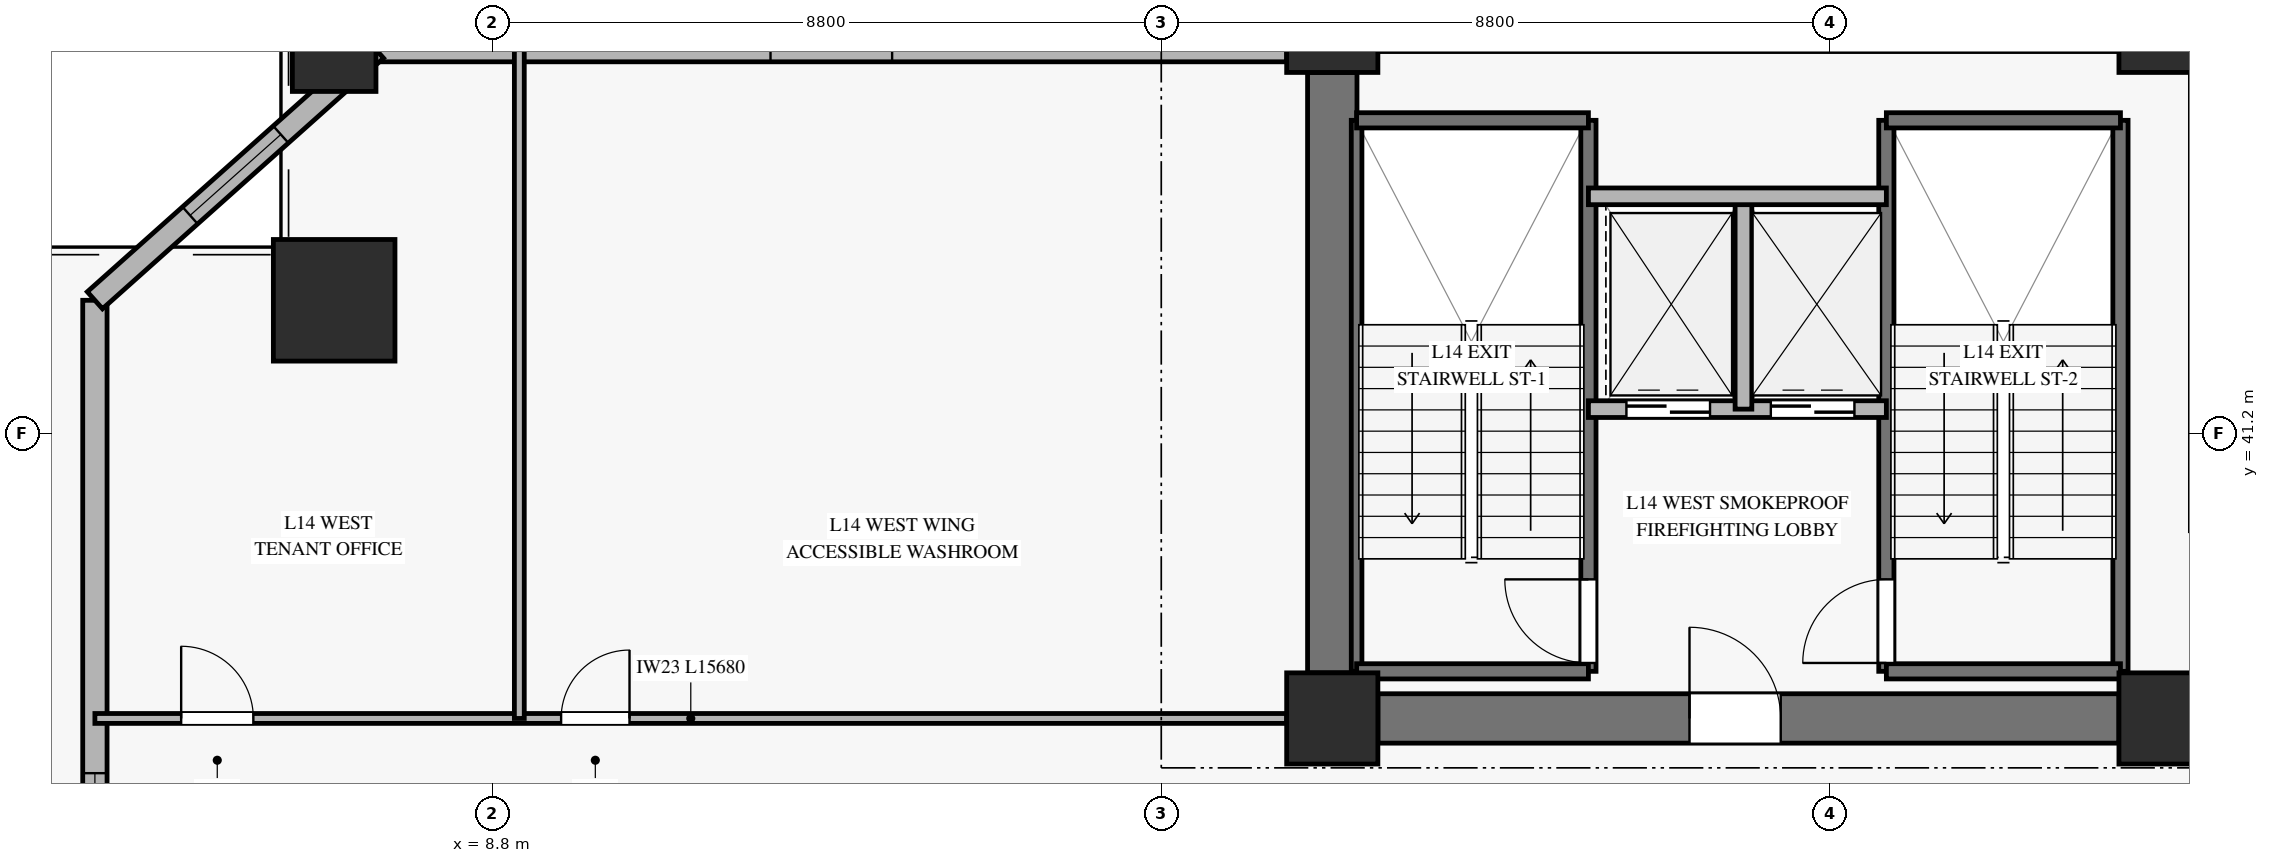
"""IFC4 building model, lengths in metres.
Left out: names, types, materials, properties, quantities, classifications, styles, units other than length and angle.
Written with IfcOpenShell. Run it as: python <this file> out.ifc"""

import sys

from ifc_helpers import new_model, si_unit, direction, frame, frame_2d, origin, origin_2d, place, context, subcontext, project, spatial, rectangle, hollow_rectangle, extrude, source, transform, mapped, element, fill, save


model = new_model("IFC4")
c1 = context("Model", 3, precision=1e-05, world=origin(), true_north=direction((0.0, 1.0)))
c2 = subcontext(c1, "Body", "Model", "MODEL_VIEW")
j1 = project(units=[si_unit("LENGTHUNIT", "METRE"), si_unit("PLANEANGLEUNIT", "RADIAN")], contexts=[c1])
p1 = place(None, origin())
s1 = spatial("IfcSite", under=j1, at=p1, CompositionType="ELEMENT")
p2 = place(p1, origin())
s2 = spatial("IfcBuilding", under=s1, at=p2, CompositionType="ELEMENT")
p3 = place(p2, frame((0.0, 0.0, 57.2)))
s3 = spatial("IfcBuildingStorey", under=s2, at=p3, CompositionType="ELEMENT", Elevation=57.2)
m1 = source(origin(), c2, "Body", "SweptSolid", [
    extrude(rectangle(XDim=1.2, YDim=1.2, at=origin_2d()), origin(), (0.0, 0.0, 1.0), 3.68),
])
for number, where, z_axis, x_axis in (
    (1, (19.85, 37.45, 0.0), (0.0, 0.0, 1.0), (1.0, 0.0, 0.0)),
    (2, (19.85, 46.55, 0.0), (0.0, 0.0, 1.0), (1.0, 0.0, 0.0)),
    (3, (30.8, 37.45, 0.0), (0.0, 0.0, 1.0), (1.0, 0.0, 0.0)),
    (4, (30.8, 46.55, 0.0), (0.0, 0.0, 1.0), (1.0, 0.0, 0.0)),
):
    element("IfcColumn", number, at=place(p3, frame(where, z_axis=z_axis, x_axis=x_axis)), inside=s3, PredefinedType="PILASTER", context=c2, shape_type="MappedRepresentation", body=[
        mapped(m1, transform((0.0, 0.0, 0.0), x_axis=(1.0, 0.0, 0.0), y_axis=(0.0, 1.0, 0.0), z_axis=(0.0, 0.0, 1.0), scale=1.0)),
    ])
p4 = place(p3, frame((20.45, 37.45, 0.0), z_axis=(0.0, 0.0, 1.0), x_axis=(1.0, 0.0, 0.0)))
e5 = element("IfcWall", 5, at=p4, inside=s3, PredefinedType="SHEAR", context=c2, shape_type="SweptSolid", body=[
    extrude(rectangle(XDim=9.75, YDim=0.65, at=frame_2d((4.875, 0.0))), origin(), (0.0, 0.0, 1.0), 3.68),
])
p5 = place(p4, frame((4.1, 0.0, 0.0)))
e6 = element("IfcOpeningElement", 6, at=p5, cuts=e5, PredefinedType="OPENING", context=c2, shape_type="SweptSolid", body=[
    extrude(rectangle(XDim=1.2, YDim=2.15, at=frame_2d((0.6, 1.075))), frame((0.0, 0.335, 0.0), z_axis=(0.0, -1.0, 0.0), x_axis=(1.0, 0.0, 0.0)), (0.0, 0.0, 1.0), 0.67),
])
p6 = place(p3, frame((19.85, 38.05, 0.0), z_axis=(0.0, 0.0, 1.0), x_axis=(0.0, 1.0, 0.0)))
e7 = element("IfcWall", 7, at=p6, inside=s3, PredefinedType="SHEAR", context=c2, shape_type="SweptSolid", body=[
    extrude(rectangle(XDim=7.9, YDim=0.65, at=frame_2d((3.95, 0.0))), origin(), (0.0, 0.0, 1.0), 3.68),
])
m2 = source(origin(), c2, "Body", "SweptSolid", [
    extrude(hollow_rectangle(XDim=1.6, YDim=1.6, WallThickness=0.075, at=origin_2d()), origin(), (0.0, 0.0, 1.0), 3.686),
])
p7 = place(p3, frame((6.718, 42.952, 0.0), z_axis=(0.056697506007, 0.007087188251, 0.998366247714), x_axis=(-0.124034734589, 0.992277876714, 0.0)))
e8 = element("IfcColumn", 8, at=p7, inside=s3, PredefinedType="COLUMN", context=c2, shape_type="MappedRepresentation", body=[
    mapped(m2, transform((0.0, 0.0, 0.0), x_axis=(1.0, 0.0, 0.0), y_axis=(0.0, 1.0, 0.0), z_axis=(0.0, 0.0, 1.0), scale=1.0)),
])
m3 = source(origin(), c2, "Body", "SweptSolid", [
    extrude(hollow_rectangle(XDim=1.1, YDim=1.1, WallThickness=0.05, at=origin_2d()), origin(), (0.0, 0.0, 1.0), 3.686),
])
p8 = place(p3, frame((6.718, 46.25, 0.0), z_axis=(0.056698929969, 0.0, 0.998391321747), x_axis=(0.0, 1.0, 0.0)))
e9 = element("IfcColumn", 9, at=p8, inside=s3, PredefinedType="COLUMN", context=c2, shape_type="MappedRepresentation", body=[
    mapped(m3, transform((0.0, 0.0, 0.0), x_axis=(1.0, 0.0, 0.0), y_axis=(0.0, 1.0, 0.0), z_axis=(0.0, 0.0, 1.0), scale=1.0)),
])
p9 = place(p3, frame((3.57, 25.777, 0.0), z_axis=(0.0, 0.0, 1.0), x_axis=(0.0, 1.0, 0.0)))
e10 = element("IfcWall", 10, at=p9, inside=s3, PredefinedType="SOLIDWALL", context=c2, shape_type="SweptSolid", body=[
    extrude(rectangle(XDim=17.175, YDim=0.32, at=frame_2d((8.587, 0.0))), origin(), (0.0, 0.0, 1.0), 3.16),
])
p10 = place(p9, frame((9.353, 0.0, 0.45)))
e11 = element("IfcOpeningElement", 11, at=p10, cuts=e10, PredefinedType="OPENING", context=c2, shape_type="SweptSolid", body=[
    extrude(rectangle(XDim=1.6, YDim=2.0, at=frame_2d((0.8, 1.0))), frame((0.0, 0.17, 0.0), z_axis=(0.0, -1.0, 0.0), x_axis=(1.0, 0.0, 0.0)), (0.0, 0.0, 1.0), 0.34),
])
p11 = place(p3, frame((7.268, 46.25, 0.0), z_axis=(0.0, 0.0, 1.0), x_axis=(1.0, 0.0, 0.0)))
e12 = element("IfcWall", 12, at=p11, inside=s3, PredefinedType="SOLIDWALL", context=c2, shape_type="SweptSolid", body=[
    extrude(rectangle(XDim=11.982, YDim=0.32, at=frame_2d((5.991, 0.0))), origin(), (0.0, 0.0, 1.0), 3.16),
])
p12 = place(p11, frame((5.191, 0.0, 0.45)))
e13 = element("IfcOpeningElement", 13, at=p12, cuts=e12, PredefinedType="OPENING", context=c2, shape_type="SweptSolid", body=[
    extrude(rectangle(XDim=1.6, YDim=2.0, at=frame_2d((0.8, 1.0))), frame((0.0, 0.17, 0.0), z_axis=(0.0, -1.0, 0.0), x_axis=(1.0, 0.0, 0.0)), (0.0, 0.0, 1.0), 0.34),
])
p13 = place(p3, frame((7.268, 46.25, 0.0), z_axis=(0.0, 0.0, 1.0), x_axis=(-0.746307341165, -0.665601496785, 0.0)))
e14 = element("IfcWall", 14, at=p13, inside=s3, PredefinedType="SOLIDWALL", context=c2, shape_type="SweptSolid", body=[
    extrude(rectangle(XDim=4.955, YDim=0.3, at=frame_2d((2.478, 0.0))), origin(), (0.0, 0.0, 1.0), 3.16),
])
p14 = place(p13, frame((1.677, 0.0, 0.45)))
e15 = element("IfcOpeningElement", 15, at=p14, cuts=e14, PredefinedType="OPENING", context=c2, shape_type="SweptSolid", body=[
    extrude(rectangle(XDim=1.6, YDim=2.0, at=frame_2d((0.8, 1.0))), frame((0.0, 0.16, 0.0), z_axis=(0.0, -1.0, 0.0), x_axis=(1.0, 0.0, 0.0)), (0.0, 0.0, 1.0), 0.32),
])
p15 = place(p3, frame((20.17, 38.07, 0.0), z_axis=(0.0, 0.0, 1.0), x_axis=(0.0, 1.0, 0.0)))
e16 = element("IfcWall", 16, at=p15, inside=s3, PredefinedType="SOLIDWALL", context=c2, shape_type="SweptSolid", body=[
    extrude(rectangle(XDim=7.25, YDim=0.14, at=frame_2d((3.625, 0.0))), origin(), (0.0, 0.0, 1.0), 3.9),
])
p16 = place(p3, frame((23.22, 38.07, 0.0), z_axis=(0.0, 0.0, 1.0), x_axis=(0.0, 1.0, 0.0)))
e17 = element("IfcWall", 17, at=p16, inside=s3, PredefinedType="SOLIDWALL", context=c2, shape_type="SweptSolid", body=[
    extrude(rectangle(XDim=7.25, YDim=0.2, at=frame_2d((3.625, 0.0))), origin(), (0.0, 0.0, 1.0), 3.9),
])
p17 = place(p16, frame((0.11, 0.0, 0.0)))
e18 = element("IfcOpeningElement", 18, at=p17, cuts=e17, PredefinedType="OPENING", context=c2, shape_type="SweptSolid", body=[
    extrude(rectangle(XDim=1.1, YDim=2.15, at=frame_2d((0.55, 1.075))), frame((0.0, 0.11, 0.0), z_axis=(0.0, -1.0, 0.0), x_axis=(1.0, 0.0, 0.0)), (0.0, 0.0, 1.0), 0.22),
])
for number, where, z_axis, x_axis in (
    (19, (20.17, 45.32, 0.0), (0.0, 0.0, 1.0), (1.0, 0.0, 0.0)),
    (20, (20.17, 38.07, 0.0), (0.0, 0.0, 1.0), (1.0, 0.0, 0.0)),
):
    element("IfcWall", number, at=place(p3, frame(where, z_axis=z_axis, x_axis=x_axis)), inside=s3, PredefinedType="SOLIDWALL", context=c2, shape_type="SweptSolid", body=[
        extrude(rectangle(XDim=3.05, YDim=0.2, at=frame_2d((1.525, 0.0))), origin(), (0.0, 0.0, 1.0), 3.9),
    ])
p18 = place(p3, frame((27.14, 38.07, 0.0), z_axis=(0.0, 0.0, 1.0), x_axis=(0.0, 1.0, 0.0)))
e21 = element("IfcWall", 21, at=p18, inside=s3, PredefinedType="SOLIDWALL", context=c2, shape_type="SweptSolid", body=[
    extrude(rectangle(XDim=7.25, YDim=0.2, at=frame_2d((3.625, 0.0))), origin(), (0.0, 0.0, 1.0), 3.9),
])
p19 = place(p18, frame((0.11, 0.0, 0.0)))
e22 = element("IfcOpeningElement", 22, at=p19, cuts=e21, PredefinedType="OPENING", context=c2, shape_type="SweptSolid", body=[
    extrude(rectangle(XDim=1.1, YDim=2.15, at=frame_2d((0.55, 1.075))), frame((0.0, 0.11, 0.0), z_axis=(0.0, -1.0, 0.0), x_axis=(1.0, 0.0, 0.0)), (0.0, 0.0, 1.0), 0.22),
])
p20 = place(p3, frame((30.22, 38.07, 0.0), z_axis=(0.0, 0.0, 1.0), x_axis=(0.0, 1.0, 0.0)))
e23 = element("IfcWall", 23, at=p20, inside=s3, PredefinedType="SOLIDWALL", context=c2, shape_type="SweptSolid", body=[
    extrude(rectangle(XDim=7.25, YDim=0.2, at=frame_2d((3.625, 0.0))), origin(), (0.0, 0.0, 1.0), 3.9),
])
for number, where, z_axis, x_axis in (
    (24, (27.14, 45.32, 0.0), (0.0, 0.0, 1.0), (1.0, 0.0, 0.0)),
    (25, (27.14, 38.07, 0.0), (0.0, 0.0, 1.0), (1.0, 0.0, 0.0)),
):
    element("IfcWall", number, at=place(p3, frame(where, z_axis=z_axis, x_axis=x_axis)), inside=s3, PredefinedType="SOLIDWALL", context=c2, shape_type="SweptSolid", body=[
        extrude(rectangle(XDim=3.08, YDim=0.2, at=frame_2d((1.54, 0.0))), origin(), (0.0, 0.0, 1.0), 3.9),
    ])
p21 = place(p3, frame((23.22, 41.52, 0.0), z_axis=(0.0, 0.0, 1.0), x_axis=(1.0, 0.0, 0.0)))
e26 = element("IfcWall", 26, at=p21, inside=s3, PredefinedType="SOLIDWALL", context=c2, shape_type="SweptSolid", body=[
    extrude(rectangle(XDim=3.92, YDim=0.22, at=frame_2d((1.96, 0.0))), origin(), (0.0, 0.0, 1.0), 3.68),
])
p22 = place(p21, frame((0.5, 0.0, 0.0)))
e27 = element("IfcOpeningElement", 27, at=p22, cuts=e26, PredefinedType="OPENING", context=c2, shape_type="SweptSolid", body=[
    extrude(rectangle(XDim=1.1, YDim=2.2, at=frame_2d((0.55, 1.1))), frame((0.0, 0.12, 0.0), z_axis=(0.0, -1.0, 0.0), x_axis=(1.0, 0.0, 0.0)), (0.0, 0.0, 1.0), 0.24),
])
p23 = place(p21, frame((2.4, 0.0, 0.0)))
e28 = element("IfcOpeningElement", 28, at=p23, cuts=e26, PredefinedType="OPENING", context=c2, shape_type="SweptSolid", body=[
    extrude(rectangle(XDim=1.1, YDim=2.2, at=frame_2d((0.55, 1.1))), frame((0.0, 0.12, 0.0), z_axis=(0.0, -1.0, 0.0), x_axis=(1.0, 0.0, 0.0)), (0.0, 0.0, 1.0), 0.24),
])
p24 = place(p3, frame((25.26, 41.52, 0.0), z_axis=(0.0, 0.0, 1.0), x_axis=(0.0, 1.0, 0.0)))
e29 = element("IfcWall", 29, at=p24, inside=s3, PredefinedType="SOLIDWALL", context=c2, shape_type="SweptSolid", body=[
    extrude(rectangle(XDim=2.8, YDim=0.22, at=frame_2d((1.4, 0.0))), origin(), (0.0, 0.0, 1.0), 3.68),
])
p25 = place(p3, frame((23.22, 44.32, 0.0), z_axis=(0.0, 0.0, 1.0), x_axis=(1.0, 0.0, 0.0)))
e30 = element("IfcWall", 30, at=p25, inside=s3, PredefinedType="SOLIDWALL", context=c2, shape_type="SweptSolid", body=[
    extrude(rectangle(XDim=3.92, YDim=0.22, at=frame_2d((1.96, 0.0))), origin(), (0.0, 0.0, 1.0), 3.68),
])
p26 = place(p3, frame((3.57, 37.45, 0.0), z_axis=(0.0, 0.0, 1.0), x_axis=(1.0, 0.0, 0.0)))
e31 = element("IfcWall", 31, at=p26, inside=s3, PredefinedType="PARTITIONING", context=c2, shape_type="SweptSolid", body=[
    extrude(rectangle(XDim=15.68, YDim=0.13, at=frame_2d((7.84, 0.0))), origin(), (0.0, 0.0, 1.0), 3.165),
])
p27 = place(p26, frame((1.135, 0.0, 0.0)))
e32 = element("IfcOpeningElement", 32, at=p27, cuts=e31, PredefinedType="OPENING", context=c2, shape_type="SweptSolid", body=[
    extrude(rectangle(XDim=0.95, YDim=2.1, at=frame_2d((0.475, 1.05))), frame((0.0, 0.075, 0.0), z_axis=(0.0, -1.0, 0.0), x_axis=(1.0, 0.0, 0.0)), (0.0, 0.0, 1.0), 0.15),
])
p28 = place(p26, frame((6.134, 0.0, 0.0)))
e33 = element("IfcOpeningElement", 33, at=p28, cuts=e31, PredefinedType="OPENING", context=c2, shape_type="SweptSolid", body=[
    extrude(rectangle(XDim=0.9, YDim=2.1, at=frame_2d((0.45, 1.05))), frame((0.0, 0.075, 0.0), z_axis=(0.0, -1.0, 0.0), x_axis=(1.0, 0.0, 0.0)), (0.0, 0.0, 1.0), 0.15),
])
p29 = place(p3, frame((9.154, 37.45, 0.0), z_axis=(0.0, 0.0, 1.0), x_axis=(0.0, 1.0, 0.0)))
e34 = element("IfcWall", 34, at=p29, inside=s3, PredefinedType="PARTITIONING", context=c2, shape_type="SweptSolid", body=[
    extrude(rectangle(XDim=8.8, YDim=0.13, at=frame_2d((4.4, 0.0))), origin(), (0.0, 0.0, 1.0), 3.68),
])
m4 = source(origin(), c2, "Body", "SweptSolid", [
    extrude(rectangle(XDim=1.6, YDim=2.0, at=frame_2d((0.8, 1.0))), frame((0.0, 0.03, 0.0), z_axis=(0.0, -1.0, 0.0), x_axis=(1.0, 0.0, 0.0)), (0.0, 0.0, 1.0), 0.06),
])
p30 = place(p10, origin())
e35 = element("IfcWindow", 35, at=p30, inside=s3, PartitioningType="SINGLE_PANEL", PredefinedType="WINDOW", context=c2, shape_type="MappedRepresentation", body=[
    mapped(m4, transform((0.0, 0.0, 0.0), x_axis=(1.0, 0.0, 0.0), y_axis=(0.0, 1.0, 0.0), z_axis=(0.0, 0.0, 1.0), scale=1.0)),
])
fill(e11, e35)
p31 = place(p14, origin())
e36 = element("IfcWindow", 36, at=p31, inside=s3, PartitioningType="SINGLE_PANEL", PredefinedType="WINDOW", context=c2, shape_type="MappedRepresentation", body=[
    mapped(m4, transform((0.0, 0.0, 0.0), x_axis=(1.0, 0.0, 0.0), y_axis=(0.0, 1.0, 0.0), z_axis=(0.0, 0.0, 1.0), scale=1.0)),
])
fill(e15, e36)
m5 = source(origin(), c2, "Body", "SweptSolid", [
    extrude(rectangle(XDim=1.1, YDim=2.15, at=frame_2d((0.55, 1.075))), frame((0.0, 0.025, 0.0), z_axis=(0.0, -1.0, 0.0), x_axis=(1.0, 0.0, 0.0)), (0.0, 0.0, 1.0), 0.05),
])
p32 = place(p17, origin())
e37 = element("IfcDoor", 37, at=p32, inside=s3, OperationType="SINGLE_SWING_RIGHT", PredefinedType="DOOR", context=c2, shape_type="MappedRepresentation", body=[
    mapped(m5, transform((0.0, 0.0, 0.0), x_axis=(1.0, 0.0, 0.0), y_axis=(0.0, 1.0, 0.0), z_axis=(0.0, 0.0, 1.0), scale=1.0)),
])
fill(e18, e37)
p33 = place(p19, origin())
e38 = element("IfcDoor", 38, at=p33, inside=s3, OperationType="SINGLE_SWING_LEFT", PredefinedType="DOOR", context=c2, shape_type="MappedRepresentation", body=[
    mapped(m5, transform((0.0, 0.0, 0.0), x_axis=(1.0, 0.0, 0.0), y_axis=(0.0, 1.0, 0.0), z_axis=(0.0, 0.0, 1.0), scale=1.0)),
])
fill(e22, e38)
m6 = source(origin(), c2, "Body", "SweptSolid", [
    extrude(rectangle(XDim=1.1, YDim=2.2, at=frame_2d((0.55, 1.1))), frame((0.0, 0.025, 0.0), z_axis=(0.0, -1.0, 0.0), x_axis=(1.0, 0.0, 0.0)), (0.0, 0.0, 1.0), 0.05),
])
p34 = place(p22, origin())
e39 = element("IfcDoor", 39, at=p34, inside=s3, OperationType="SLIDING_TO_LEFT", PredefinedType="DOOR", context=c2, shape_type="MappedRepresentation", body=[
    mapped(m6, transform((0.0, 0.0, 0.0), x_axis=(1.0, 0.0, 0.0), y_axis=(0.0, 1.0, 0.0), z_axis=(0.0, 0.0, 1.0), scale=1.0)),
])
fill(e27, e39)
p35 = place(p23, origin())
e40 = element("IfcDoor", 40, at=p35, inside=s3, OperationType="SLIDING_TO_LEFT", PredefinedType="DOOR", context=c2, shape_type="MappedRepresentation", body=[
    mapped(m6, transform((0.0, 0.0, 0.0), x_axis=(1.0, 0.0, 0.0), y_axis=(0.0, 1.0, 0.0), z_axis=(0.0, 0.0, 1.0), scale=1.0)),
])
fill(e28, e40)
m7 = source(origin(), c2, "Body", "SweptSolid", [
    extrude(rectangle(XDim=1.2, YDim=2.15, at=frame_2d((0.6, 1.075))), frame((0.0, 0.025, 0.0), z_axis=(0.0, -1.0, 0.0), x_axis=(1.0, 0.0, 0.0)), (0.0, 0.0, 1.0), 0.05),
])
p36 = place(p5, origin())
e41 = element("IfcDoor", 41, at=p36, inside=s3, OperationType="SINGLE_SWING_LEFT", PredefinedType="DOOR", context=c2, shape_type="MappedRepresentation", body=[
    mapped(m7, transform((0.0, 0.0, 0.0), x_axis=(1.0, 0.0, 0.0), y_axis=(0.0, 1.0, 0.0), z_axis=(0.0, 0.0, 1.0), scale=1.0)),
])
fill(e6, e41)
m8 = source(origin(), c2, "Body", "SweptSolid", [
    extrude(rectangle(XDim=0.95, YDim=2.1, at=frame_2d((0.475, 1.05))), frame((0.0, 0.025, 0.0), z_axis=(0.0, -1.0, 0.0), x_axis=(1.0, 0.0, 0.0)), (0.0, 0.0, 1.0), 0.05),
])
p37 = place(p27, origin())
e42 = element("IfcDoor", 42, at=p37, inside=s3, OperationType="SINGLE_SWING_LEFT", PredefinedType="DOOR", context=c2, shape_type="MappedRepresentation", body=[
    mapped(m8, transform((0.0, 0.0, 0.0), x_axis=(1.0, 0.0, 0.0), y_axis=(0.0, 1.0, 0.0), z_axis=(0.0, 0.0, 1.0), scale=1.0)),
])
fill(e32, e42)
m9 = source(origin(), c2, "Body", "SweptSolid", [
    extrude(rectangle(XDim=0.9, YDim=2.1, at=frame_2d((0.45, 1.05))), frame((0.0, 0.025, 0.0), z_axis=(0.0, -1.0, 0.0), x_axis=(1.0, 0.0, 0.0)), (0.0, 0.0, 1.0), 0.05),
])
p38 = place(p28, origin())
e43 = element("IfcDoor", 43, at=p38, inside=s3, OperationType="SINGLE_SWING_RIGHT", PredefinedType="DOOR", context=c2, shape_type="MappedRepresentation", body=[
    mapped(m9, transform((0.0, 0.0, 0.0), x_axis=(1.0, 0.0, 0.0), y_axis=(0.0, 1.0, 0.0), z_axis=(0.0, 0.0, 1.0), scale=1.0)),
])
fill(e33, e43)
save(model, sys.argv[1])
